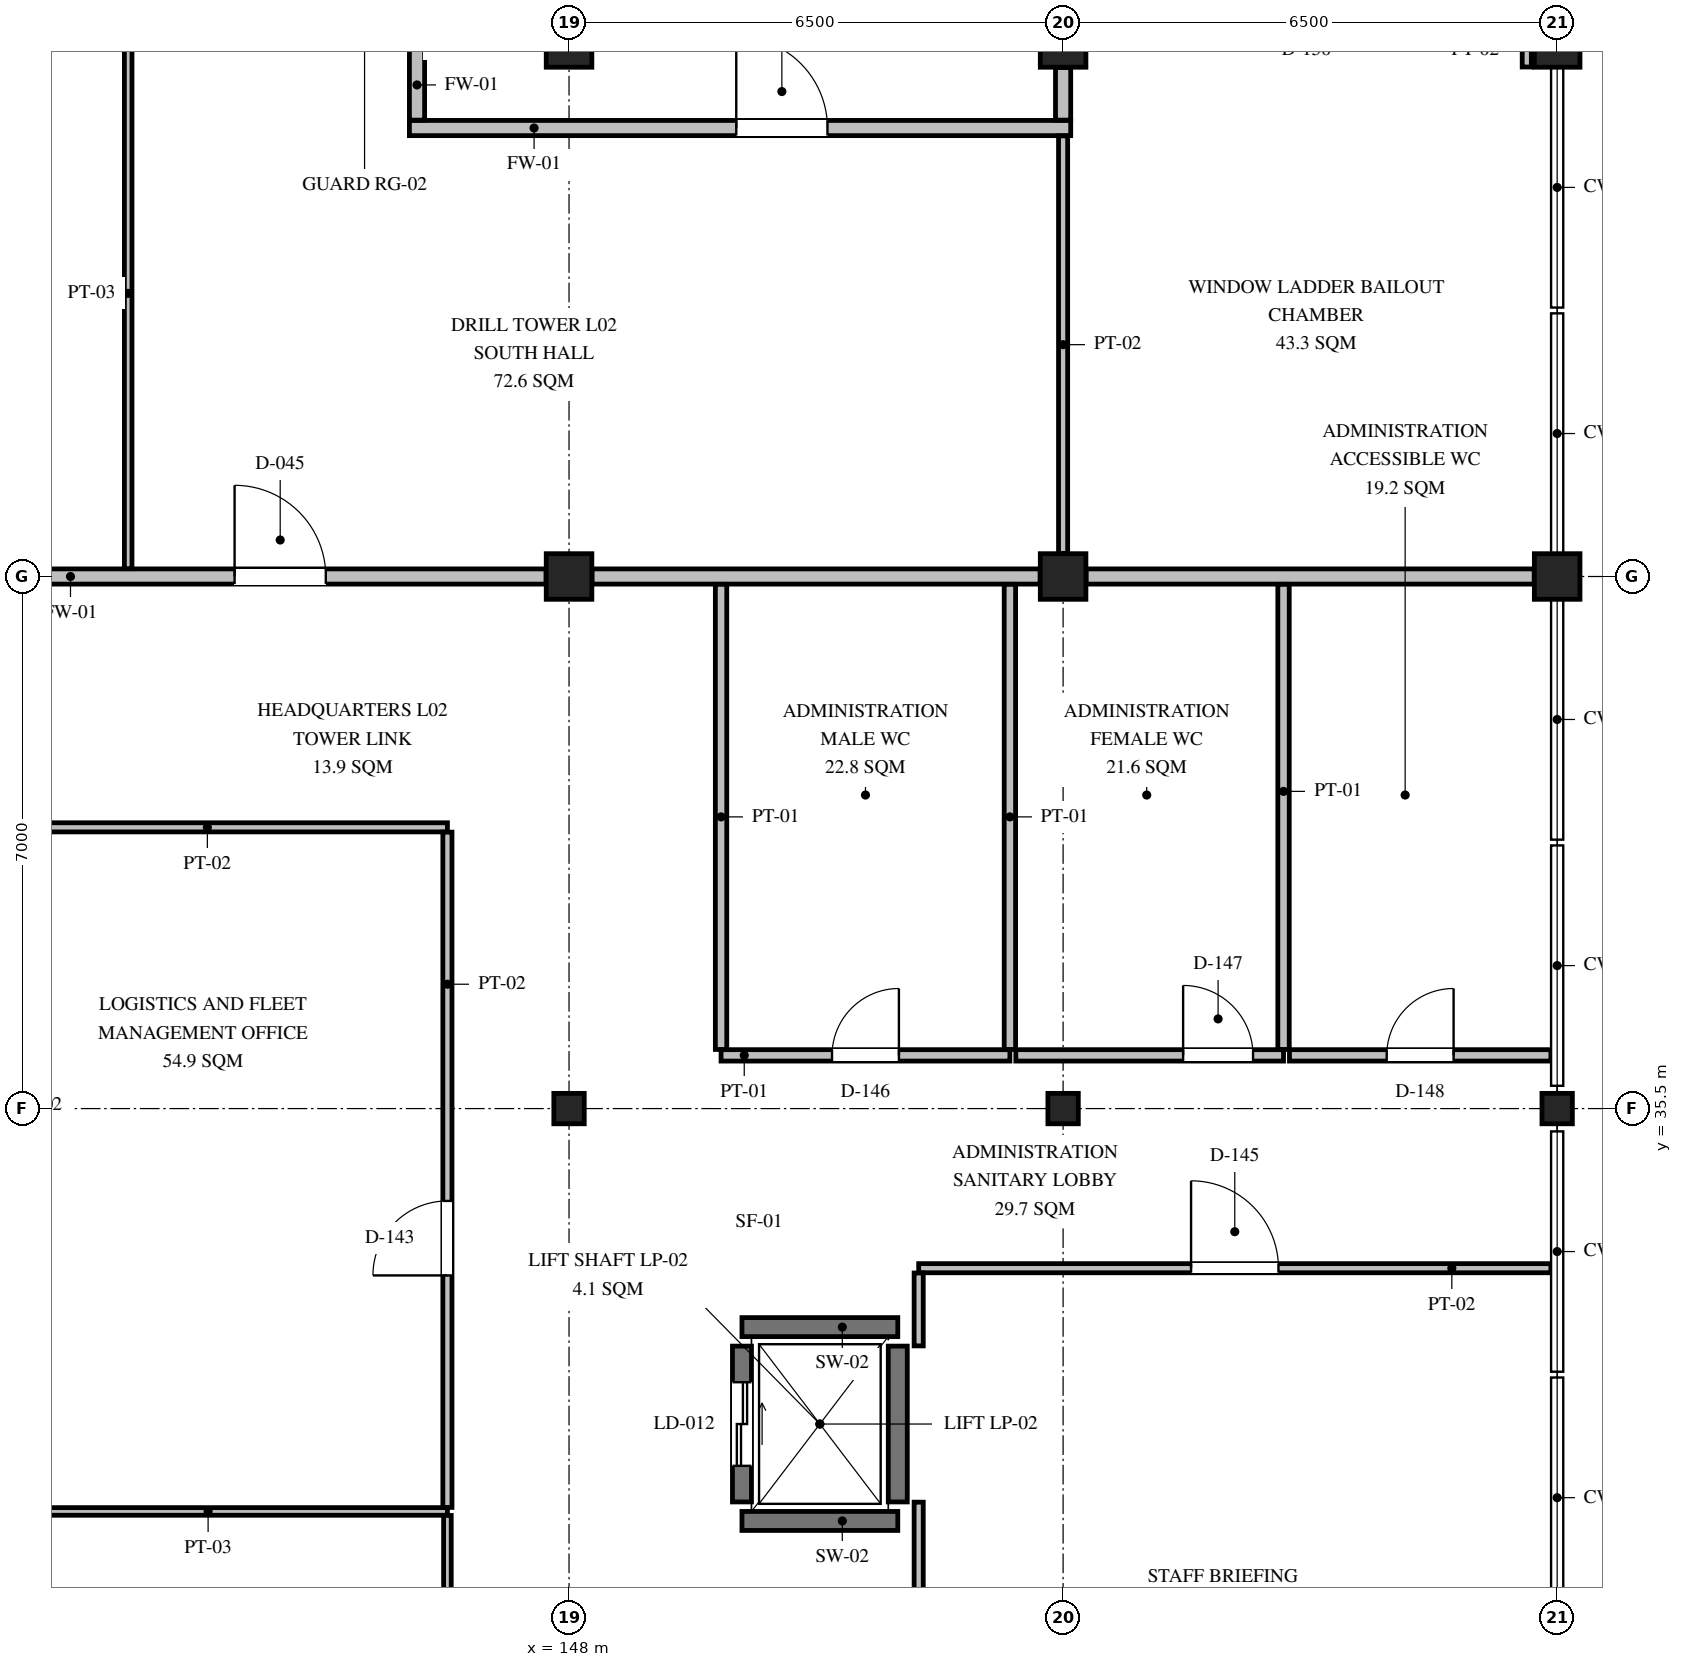
"""IFC4 building model, lengths in metres.
Left out: names, types, materials, properties, quantities, classifications, styles, units other than length and angle.
Written with IfcOpenShell. Run it as: python <this file> out.ifc"""

import sys

from ifc_helpers import new_model, si_unit, direction, frame, frame_2d, origin, origin_2d, place, context, subcontext, project, spatial, rectangle, i_section, extrude, element, fill, save


model = new_model("IFC4")
c1 = context("Model", 3, precision=1e-05, world=origin(), true_north=direction((0.0, 1.0)))
c2 = subcontext(c1, "Body", "Model", "MODEL_VIEW")
j1 = project(units=[si_unit("LENGTHUNIT", "METRE"), si_unit("PLANEANGLEUNIT", "RADIAN")], contexts=[c1])
p1 = place(None, origin())
s1 = spatial("IfcSite", under=j1, at=p1, CompositionType="ELEMENT")
p2 = place(p1, origin())
s2 = spatial("IfcBuilding", under=s1, at=p2, CompositionType="ELEMENT")
p3 = place(p2, frame((0.0, 0.0, 5.85)))
s3 = spatial("IfcBuildingStorey", under=s2, at=p3, CompositionType="ELEMENT", Elevation=5.85)
p4 = place(p3, frame((148.0, 35.5, 0.0), z_axis=(0.0, 0.0, 1.0), x_axis=(1.0, 0.0, 0.0)))
e1 = element("IfcColumn", 1, at=p4, inside=s3, PredefinedType="COLUMN", context=c2, shape_type="SweptSolid", body=[
    extrude(i_section(OverallWidth=0.4, OverallDepth=0.4, WebThickness=0.013, FlangeThickness=0.021, FilletRadius=0.022, at=origin_2d()), origin(), (0.0, 0.0, 1.0), 4.2),
])
for number, where, z_axis, x_axis in (
    (2, (148.0, 42.5, 0.0), (0.0, 0.0, 1.0), (1.0, 0.0, 0.0)),
    (3, (148.0, 49.5, 0.0), (0.0, 0.0, 1.0), (1.0, 0.0, 0.0)),
):
    element("IfcColumn", number, at=place(p3, frame(where, z_axis=z_axis, x_axis=x_axis)), inside=s3, PredefinedType="COLUMN", context=c2, shape_type="SweptSolid", body=[
        extrude(rectangle(XDim=0.6, YDim=0.6, at=origin_2d()), origin(), (0.0, 0.0, 1.0), 4.2),
    ])
p5 = place(p3, frame((154.5, 35.5, 0.0), z_axis=(0.0, 0.0, 1.0), x_axis=(1.0, 0.0, 0.0)))
e4 = element("IfcColumn", 4, at=p5, inside=s3, PredefinedType="COLUMN", context=c2, shape_type="SweptSolid", body=[
    extrude(i_section(OverallWidth=0.4, OverallDepth=0.4, WebThickness=0.013, FlangeThickness=0.021, FilletRadius=0.022, at=origin_2d()), origin(), (0.0, 0.0, 1.0), 4.2),
])
for number, where, z_axis, x_axis in (
    (5, (154.5, 42.5, 0.0), (0.0, 0.0, 1.0), (1.0, 0.0, 0.0)),
    (6, (154.5, 49.5, 0.0), (0.0, 0.0, 1.0), (1.0, 0.0, 0.0)),
):
    element("IfcColumn", number, at=place(p3, frame(where, z_axis=z_axis, x_axis=x_axis)), inside=s3, PredefinedType="COLUMN", context=c2, shape_type="SweptSolid", body=[
        extrude(rectangle(XDim=0.6, YDim=0.6, at=origin_2d()), origin(), (0.0, 0.0, 1.0), 4.2),
    ])
p6 = place(p3, frame((161.0, 35.5, 0.0), z_axis=(0.0, 0.0, 1.0), x_axis=(1.0, 0.0, 0.0)))
e7 = element("IfcColumn", 7, at=p6, inside=s3, PredefinedType="COLUMN", context=c2, shape_type="SweptSolid", body=[
    extrude(i_section(OverallWidth=0.4, OverallDepth=0.4, WebThickness=0.013, FlangeThickness=0.021, FilletRadius=0.022, at=origin_2d()), origin(), (0.0, 0.0, 1.0), 4.2),
])
for number, where, z_axis, x_axis in (
    (8, (161.0, 42.5, 0.0), (0.0, 0.0, 1.0), (1.0, 0.0, 0.0)),
    (9, (161.0, 49.5, 0.0), (0.0, 0.0, 1.0), (1.0, 0.0, 0.0)),
):
    element("IfcColumn", number, at=place(p3, frame(where, z_axis=z_axis, x_axis=x_axis)), inside=s3, PredefinedType="COLUMN", context=c2, shape_type="SweptSolid", body=[
        extrude(rectangle(XDim=0.6, YDim=0.6, at=origin_2d()), origin(), (0.0, 0.0, 1.0), 4.2),
    ])
for number, where, z_axis, x_axis in (
    (10, (150.275, 30.075, 0.0), (0.0, 0.0, 1.0), (1.0, 0.0, 0.0)),
    (11, (150.275, 32.625, 0.0), (0.0, 0.0, 1.0), (1.0, 0.0, 0.0)),
):
    element("IfcWall", number, at=place(p3, frame(where, z_axis=z_axis, x_axis=x_axis)), inside=s3, PredefinedType="SHEAR", context=c2, shape_type="SweptSolid", body=[
        extrude(rectangle(XDim=2.05, YDim=0.25, at=frame_2d((1.025, 0.0))), origin(), (0.0, 0.0, 1.0), 3.96),
    ])
p7 = place(p3, frame((150.275, 30.325, 0.0), z_axis=(0.0, 0.0, 1.0), x_axis=(0.0, 1.0, 0.0)))
e12 = element("IfcWall", 12, at=p7, inside=s3, PredefinedType="SHEAR", context=c2, shape_type="SweptSolid", body=[
    extrude(rectangle(XDim=2.05, YDim=0.25, at=frame_2d((1.025, 0.0))), origin(), (0.0, 0.0, 1.0), 3.96),
])
p8 = place(p7, frame((0.475, 0.0, 0.0)))
e13 = element("IfcOpeningElement", 13, at=p8, cuts=e12, PredefinedType="OPENING", context=c2, shape_type="SweptSolid", body=[
    extrude(rectangle(XDim=1.1, YDim=2.15, at=frame_2d((0.55, 1.075))), frame((0.0, 0.135, 0.0), z_axis=(0.0, -1.0, 0.0), x_axis=(1.0, 0.0, 0.0)), (0.0, 0.0, 1.0), 0.27),
])
p9 = place(p3, frame((152.325, 30.325, 0.0), z_axis=(0.0, 0.0, 1.0), x_axis=(0.0, 1.0, 0.0)))
e14 = element("IfcWall", 14, at=p9, inside=s3, PredefinedType="SHEAR", context=c2, shape_type="SweptSolid", body=[
    extrude(rectangle(XDim=2.05, YDim=0.25, at=frame_2d((1.025, 0.0))), origin(), (0.0, 0.0, 1.0), 3.96),
])
p10 = place(p3, frame((140.302, 42.5, 0.0), z_axis=(0.0, 0.0, 1.0), x_axis=(1.0, 0.0, 0.0)))
e15 = element("IfcWall", 15, at=p10, inside=s3, PredefinedType="PARTITIONING", context=c2, shape_type="SweptSolid", body=[
    extrude(rectangle(XDim=7.396, YDim=0.2, at=frame_2d((3.698, 0.0))), origin(), (0.0, 0.0, 1.0), 3.154),
])
p11 = place(p10, frame((3.298, 0.0, 0.0)))
e16 = element("IfcOpeningElement", 16, at=p11, cuts=e15, PredefinedType="OPENING", context=c2, shape_type="SweptSolid", body=[
    extrude(rectangle(XDim=1.2, YDim=2.15, at=frame_2d((0.6, 1.075))), frame((0.0, 0.11, 0.0), z_axis=(0.0, -1.0, 0.0), x_axis=(1.0, 0.0, 0.0)), (0.0, 0.0, 1.0), 0.22),
])
p12 = place(p3, frame((148.302, 42.5, 0.0), z_axis=(0.0, 0.0, 1.0), x_axis=(1.0, 0.0, 0.0)))
e17 = element("IfcWall", 17, at=p12, inside=s3, PredefinedType="PARTITIONING", context=c2, shape_type="SweptSolid", body=[
    extrude(rectangle(XDim=5.896, YDim=0.2, at=frame_2d((2.948, 0.0))), origin(), (0.0, 0.0, 1.0), 3.054),
])
p13 = place(p3, frame((154.802, 42.5, 0.0), z_axis=(0.0, 0.0, 1.0), x_axis=(1.0, 0.0, 0.0)))
e18 = element("IfcWall", 18, at=p13, inside=s3, PredefinedType="PARTITIONING", context=c2, shape_type="SweptSolid", body=[
    extrude(rectangle(XDim=5.896, YDim=0.2, at=frame_2d((2.948, 0.0))), origin(), (0.0, 0.0, 1.0), 2.854),
])
p14 = place(p3, frame((145.9, 48.4, 0.0), z_axis=(0.0, 0.0, 1.0), x_axis=(1.0, 0.0, 0.0)))
e19 = element("IfcWall", 19, at=p14, inside=s3, PredefinedType="PARTITIONING", context=c2, shape_type="SweptSolid", body=[
    extrude(rectangle(XDim=8.7, YDim=0.2, at=frame_2d((4.35, 0.0))), origin(), (0.0, 0.0, 1.0), 4.0),
])
p15 = place(p14, frame((4.3, 0.0, 0.0)))
e20 = element("IfcOpeningElement", 20, at=p15, cuts=e19, PredefinedType="OPENING", context=c2, shape_type="SweptSolid", body=[
    extrude(rectangle(XDim=1.2, YDim=2.15, at=frame_2d((0.6, 1.075))), frame((0.0, 0.11, 0.0), z_axis=(0.0, -1.0, 0.0), x_axis=(1.0, 0.0, 0.0)), (0.0, 0.0, 1.0), 0.22),
])
p16 = place(p3, frame((146.0, 48.504, 0.0), z_axis=(0.0, 0.0, 1.0), x_axis=(0.0, 1.0, 0.0)))
e21 = element("IfcWall", 21, at=p16, inside=s3, PredefinedType="PARTITIONING", context=c2, shape_type="SweptSolid", body=[
    extrude(rectangle(XDim=3.967, YDim=0.2, at=frame_2d((1.983, 0.0))), origin(), (0.0, 0.0, 1.0), 4.0),
])
p17 = place(p16, frame((1.946, 0.0, 0.0)))
e22 = element("IfcOpeningElement", 22, at=p17, cuts=e21, PredefinedType="OPENING", context=c2, shape_type="SweptSolid", body=[
    extrude(rectangle(XDim=1.2, YDim=2.15, at=frame_2d((0.6, 1.075))), frame((0.0, 0.11, 0.0), z_axis=(0.0, -1.0, 0.0), x_axis=(1.0, 0.0, 0.0)), (0.0, 0.0, 1.0), 0.22),
])
p18 = place(p3, frame((154.5, 48.504, 0.0), z_axis=(0.0, 0.0, 1.0), x_axis=(0.0, 1.0, 0.0)))
e23 = element("IfcWall", 23, at=p18, inside=s3, PredefinedType="PARTITIONING", context=c2, shape_type="SweptSolid", body=[
    extrude(rectangle(XDim=0.692, YDim=0.2, at=frame_2d((0.346, 0.0))), origin(), (0.0, 0.0, 1.0), 3.564),
])
p19 = place(p3, frame((140.103, 30.2, 0.0), z_axis=(0.0, 0.0, 1.0), x_axis=(1.0, 0.0, 0.0)))
e24 = element("IfcWall", 24, at=p19, inside=s3, PredefinedType="PARTITIONING", context=c2, shape_type="SweptSolid", body=[
    extrude(rectangle(XDim=6.297, YDim=0.1, at=frame_2d((3.148, 0.0))), origin(), (0.0, 0.0, 1.0), 3.96),
])
p20 = place(p3, frame((146.4, 20.653, 0.0), z_axis=(0.0, 0.0, 1.0), x_axis=(0.0, 1.0, 0.0)))
e25 = element("IfcWall", 25, at=p20, inside=s3, PredefinedType="PARTITIONING", context=c2, shape_type="SweptSolid", body=[
    extrude(rectangle(XDim=9.494, YDim=0.1, at=frame_2d((4.747, 0.0))), origin(), (0.0, 0.0, 1.0), 3.71),
])
p21 = place(p20, frame((4.247, 0.0, 0.0)))
e26 = element("IfcOpeningElement", 26, at=p21, cuts=e25, PredefinedType="OPENING", context=c2, shape_type="SweptSolid", body=[
    extrude(rectangle(XDim=1.0, YDim=2.1, at=frame_2d((0.5, 1.05))), frame((0.0, 0.06, 0.0), z_axis=(0.0, -1.0, 0.0), x_axis=(1.0, 0.0, 0.0)), (0.0, 0.0, 1.0), 0.12),
])
p22 = place(p3, frame((140.083, 39.2, 0.0), z_axis=(0.0, 0.0, 1.0), x_axis=(1.0, 0.0, 0.0)))
e27 = element("IfcWall", 27, at=p22, inside=s3, PredefinedType="PARTITIONING", context=c2, shape_type="SweptSolid", body=[
    extrude(rectangle(XDim=6.317, YDim=0.12, at=frame_2d((3.158, 0.0))), origin(), (0.0, 0.0, 1.0), 3.96),
])
p23 = place(p3, frame((146.4, 30.253, 0.0), z_axis=(0.0, 0.0, 1.0), x_axis=(0.0, 1.0, 0.0)))
e28 = element("IfcWall", 28, at=p23, inside=s3, PredefinedType="PARTITIONING", context=c2, shape_type="SweptSolid", body=[
    extrude(rectangle(XDim=8.884, YDim=0.12, at=frame_2d((4.442, 0.0))), origin(), (0.0, 0.0, 1.0), 3.96),
])
p24 = place(p23, frame((3.052, 0.0, 0.0)))
e29 = element("IfcOpeningElement", 29, at=p24, cuts=e28, PredefinedType="OPENING", context=c2, shape_type="SweptSolid", body=[
    extrude(rectangle(XDim=0.98, YDim=2.1, at=frame_2d((0.49, 1.05))), frame((0.0, 0.07, 0.0), z_axis=(0.0, -1.0, 0.0), x_axis=(1.0, 0.0, 0.0)), (0.0, 0.0, 1.0), 0.14),
])
p25 = place(p3, frame((152.6, 33.4, 0.0), z_axis=(0.0, 0.0, 1.0), x_axis=(1.0, 0.0, 0.0)))
e30 = element("IfcWall", 30, at=p25, inside=s3, PredefinedType="PARTITIONING", context=c2, shape_type="SweptSolid", body=[
    extrude(rectangle(XDim=8.317, YDim=0.12, at=frame_2d((4.158, 0.0))), origin(), (0.0, 0.0, 1.0), 3.96),
])
p26 = place(p25, frame((3.583, 0.0, 0.0)))
e31 = element("IfcOpeningElement", 31, at=p26, cuts=e30, PredefinedType="OPENING", context=c2, shape_type="SweptSolid", body=[
    extrude(rectangle(XDim=1.15, YDim=2.1, at=frame_2d((0.575, 1.05))), frame((0.0, 0.07, 0.0), z_axis=(0.0, -1.0, 0.0), x_axis=(1.0, 0.0, 0.0)), (0.0, 0.0, 1.0), 0.14),
])
p27 = place(p3, frame((152.6, 26.178, 0.0), z_axis=(0.0, 0.0, 1.0), x_axis=(0.0, 1.0, 0.0)))
e32 = element("IfcWall", 32, at=p27, inside=s3, PredefinedType="PARTITIONING", context=c2, shape_type="SweptSolid", body=[
    extrude(rectangle(XDim=4.144, YDim=0.12, at=frame_2d((2.072, 0.0))), origin(), (0.0, 0.0, 1.0), 3.96),
])
p28 = place(p3, frame((152.6, 32.378, 0.0), z_axis=(0.0, 0.0, 1.0), x_axis=(0.0, 1.0, 0.0)))
e33 = element("IfcWall", 33, at=p28, inside=s3, PredefinedType="PARTITIONING", context=c2, shape_type="SweptSolid", body=[
    extrude(rectangle(XDim=0.959, YDim=0.12, at=frame_2d((0.479, 0.0))), origin(), (0.0, 0.0, 1.0), 3.96),
])
p29 = place(p3, frame((150.0, 36.2, 0.0), z_axis=(0.0, 0.0, 1.0), x_axis=(1.0, 0.0, 0.0)))
e34 = element("IfcWall", 34, at=p29, inside=s3, PredefinedType="PARTITIONING", context=c2, shape_type="SweptSolid", body=[
    extrude(rectangle(XDim=3.8, YDim=0.15, at=frame_2d((1.9, 0.0))), origin(), (0.0, 0.0, 1.0), 3.96),
])
p30 = place(p29, frame((1.46, 0.0, 0.0)))
e35 = element("IfcOpeningElement", 35, at=p30, cuts=e34, PredefinedType="OPENING", context=c2, shape_type="SweptSolid", body=[
    extrude(rectangle(XDim=0.88, YDim=2.1, at=frame_2d((0.44, 1.05))), frame((0.0, 0.085, 0.0), z_axis=(0.0, -1.0, 0.0), x_axis=(1.0, 0.0, 0.0)), (0.0, 0.0, 1.0), 0.17),
])
p31 = place(p3, frame((150.0, 36.278, 0.0), z_axis=(0.0, 0.0, 1.0), x_axis=(0.0, 1.0, 0.0)))
e36 = element("IfcWall", 36, at=p31, inside=s3, PredefinedType="PARTITIONING", context=c2, shape_type="SweptSolid", body=[
    extrude(rectangle(XDim=6.119, YDim=0.15, at=frame_2d((3.06, 0.0))), origin(), (0.0, 0.0, 1.0), 3.71),
])
p32 = place(p3, frame((153.8, 36.278, 0.0), z_axis=(0.0, 0.0, 1.0), x_axis=(0.0, 1.0, 0.0)))
e37 = element("IfcWall", 37, at=p32, inside=s3, PredefinedType="PARTITIONING", context=c2, shape_type="SweptSolid", body=[
    extrude(rectangle(XDim=6.119, YDim=0.15, at=frame_2d((3.06, 0.0))), origin(), (0.0, 0.0, 1.0), 3.96),
])
p33 = place(p3, frame((153.878, 36.2, 0.0), z_axis=(0.0, 0.0, 1.0), x_axis=(1.0, 0.0, 0.0)))
e38 = element("IfcWall", 38, at=p33, inside=s3, PredefinedType="PARTITIONING", context=c2, shape_type="SweptSolid", body=[
    extrude(rectangle(XDim=3.522, YDim=0.15, at=frame_2d((1.761, 0.0))), origin(), (0.0, 0.0, 1.0), 3.96),
])
p34 = place(p33, frame((2.201, 0.0, 0.0)))
e39 = element("IfcOpeningElement", 39, at=p34, cuts=e38, PredefinedType="OPENING", context=c2, shape_type="SweptSolid", body=[
    extrude(rectangle(XDim=0.92, YDim=2.1, at=frame_2d((0.46, 1.05))), frame((0.0, 0.085, 0.0), z_axis=(0.0, -1.0, 0.0), x_axis=(1.0, 0.0, 0.0)), (0.0, 0.0, 1.0), 0.17),
])
p35 = place(p3, frame((157.4, 36.278, 0.0), z_axis=(0.0, 0.0, 1.0), x_axis=(0.0, 1.0, 0.0)))
e40 = element("IfcWall", 40, at=p35, inside=s3, PredefinedType="PARTITIONING", context=c2, shape_type="SweptSolid", body=[
    extrude(rectangle(XDim=6.119, YDim=0.15, at=frame_2d((3.06, 0.0))), origin(), (0.0, 0.0, 1.0), 3.96),
])
p36 = place(p3, frame((157.478, 36.2, 0.0), z_axis=(0.0, 0.0, 1.0), x_axis=(1.0, 0.0, 0.0)))
e41 = element("IfcWall", 41, at=p36, inside=s3, PredefinedType="PARTITIONING", context=c2, shape_type="SweptSolid", body=[
    extrude(rectangle(XDim=3.439, YDim=0.15, at=frame_2d((1.719, 0.0))), origin(), (0.0, 0.0, 1.0), 3.96),
])
p37 = place(p36, frame((1.28, 0.0, 0.0)))
e42 = element("IfcOpeningElement", 42, at=p37, cuts=e41, PredefinedType="OPENING", context=c2, shape_type="SweptSolid", body=[
    extrude(rectangle(XDim=0.88, YDim=2.1, at=frame_2d((0.44, 1.05))), frame((0.0, 0.085, 0.0), z_axis=(0.0, -1.0, 0.0), x_axis=(1.0, 0.0, 0.0)), (0.0, 0.0, 1.0), 0.17),
])
p38 = place(p3, frame((142.2, 42.603, 0.0), z_axis=(0.0, 0.0, 1.0), x_axis=(0.0, 1.0, 0.0)))
e43 = element("IfcWall", 43, at=p38, inside=s3, PredefinedType="PARTITIONING", context=c2, shape_type="SweptSolid", body=[
    extrude(rectangle(XDim=7.244, YDim=0.1, at=frame_2d((3.622, 0.0))), origin(), (0.0, 0.0, 1.0), 4.0),
])
p39 = place(p3, frame((154.5, 42.803, 0.0), z_axis=(0.0, 0.0, 1.0), x_axis=(0.0, 1.0, 0.0)))
e44 = element("IfcWall", 44, at=p39, inside=s3, PredefinedType="PARTITIONING", context=c2, shape_type="SweptSolid", body=[
    extrude(rectangle(XDim=5.494, YDim=0.12, at=frame_2d((2.747, 0.0))), origin(), (0.0, 0.0, 1.0), 3.564),
])
p40 = place(p3, frame((160.6, 49.203, 0.0), z_axis=(0.0, 0.0, 1.0), x_axis=(0.0, 1.0, 0.0)))
e45 = element("IfcWall", 45, at=p40, inside=s3, PredefinedType="PARTITIONING", context=c2, shape_type="SweptSolid", body=[
    extrude(rectangle(XDim=0.594, YDim=0.12, at=frame_2d((0.297, 0.0))), origin(), (0.0, 0.0, 1.0), 4.0),
])
p41 = place(p8, origin())
e46 = element("IfcDoor", 46, at=p41, inside=s3, OperationType="DOUBLE_DOOR_SLIDING", PredefinedType="DOOR", context=c2, shape_type="SweptSolid", body=[
    extrude(rectangle(XDim=1.1, YDim=2.15, at=frame_2d((0.55, 1.075))), frame((0.0, 0.025, 0.0), z_axis=(0.0, -1.0, 0.0), x_axis=(1.0, 0.0, 0.0)), (0.0, 0.0, 1.0), 0.05),
])
fill(e13, e46)
p42 = place(p11, origin())
e47 = element("IfcDoor", 47, at=p42, inside=s3, OperationType="SINGLE_SWING_LEFT", PredefinedType="DOOR", context=c2, shape_type="SweptSolid", body=[
    extrude(rectangle(XDim=1.2, YDim=2.15, at=frame_2d((0.6, 1.075))), frame((0.0, 0.025, 0.0), z_axis=(0.0, -1.0, 0.0), x_axis=(1.0, 0.0, 0.0)), (0.0, 0.0, 1.0), 0.05),
])
fill(e16, e47)
p43 = place(p15, origin())
e48 = element("IfcDoor", 48, at=p43, inside=s3, OperationType="SINGLE_SWING_LEFT", PredefinedType="DOOR", context=c2, shape_type="SweptSolid", body=[
    extrude(rectangle(XDim=1.2, YDim=2.15, at=frame_2d((0.6, 1.075))), frame((0.0, 0.025, 0.0), z_axis=(0.0, -1.0, 0.0), x_axis=(1.0, 0.0, 0.0)), (0.0, 0.0, 1.0), 0.05),
])
fill(e20, e48)
p44 = place(p24, origin())
e49 = element("IfcDoor", 49, at=p44, inside=s3, OperationType="SINGLE_SWING_LEFT", PredefinedType="DOOR", context=c2, shape_type="SweptSolid", body=[
    extrude(rectangle(XDim=0.98, YDim=2.1, at=frame_2d((0.49, 1.05))), frame((0.0, 0.025, 0.0), z_axis=(0.0, -1.0, 0.0), x_axis=(1.0, 0.0, 0.0)), (0.0, 0.0, 1.0), 0.05),
])
fill(e29, e49)
p45 = place(p26, origin())
e50 = element("IfcDoor", 50, at=p45, inside=s3, OperationType="SINGLE_SWING_LEFT", PredefinedType="DOOR", context=c2, shape_type="SweptSolid", body=[
    extrude(rectangle(XDim=1.15, YDim=2.1, at=frame_2d((0.575, 1.05))), frame((0.0, 0.025, 0.0), z_axis=(0.0, -1.0, 0.0), x_axis=(1.0, 0.0, 0.0)), (0.0, 0.0, 1.0), 0.05),
])
fill(e31, e50)
p46 = place(p30, origin())
e51 = element("IfcDoor", 51, at=p46, inside=s3, OperationType="SINGLE_SWING_RIGHT", PredefinedType="DOOR", context=c2, shape_type="SweptSolid", body=[
    extrude(rectangle(XDim=0.88, YDim=2.1, at=frame_2d((0.44, 1.05))), frame((0.0, 0.025, 0.0), z_axis=(0.0, -1.0, 0.0), x_axis=(1.0, 0.0, 0.0)), (0.0, 0.0, 1.0), 0.05),
])
fill(e35, e51)
p47 = place(p34, origin())
e52 = element("IfcDoor", 52, at=p47, inside=s3, OperationType="SINGLE_SWING_LEFT", PredefinedType="DOOR", context=c2, shape_type="SweptSolid", body=[
    extrude(rectangle(XDim=0.92, YDim=2.1, at=frame_2d((0.46, 1.05))), frame((0.0, 0.025, 0.0), z_axis=(0.0, -1.0, 0.0), x_axis=(1.0, 0.0, 0.0)), (0.0, 0.0, 1.0), 0.05),
])
fill(e39, e52)
p48 = place(p37, origin())
e53 = element("IfcDoor", 53, at=p48, inside=s3, OperationType="SINGLE_SWING_RIGHT", PredefinedType="DOOR", context=c2, shape_type="SweptSolid", body=[
    extrude(rectangle(XDim=0.88, YDim=2.1, at=frame_2d((0.44, 1.05))), frame((0.0, 0.025, 0.0), z_axis=(0.0, -1.0, 0.0), x_axis=(1.0, 0.0, 0.0)), (0.0, 0.0, 1.0), 0.05),
])
fill(e42, e53)
save(model, sys.argv[1])
